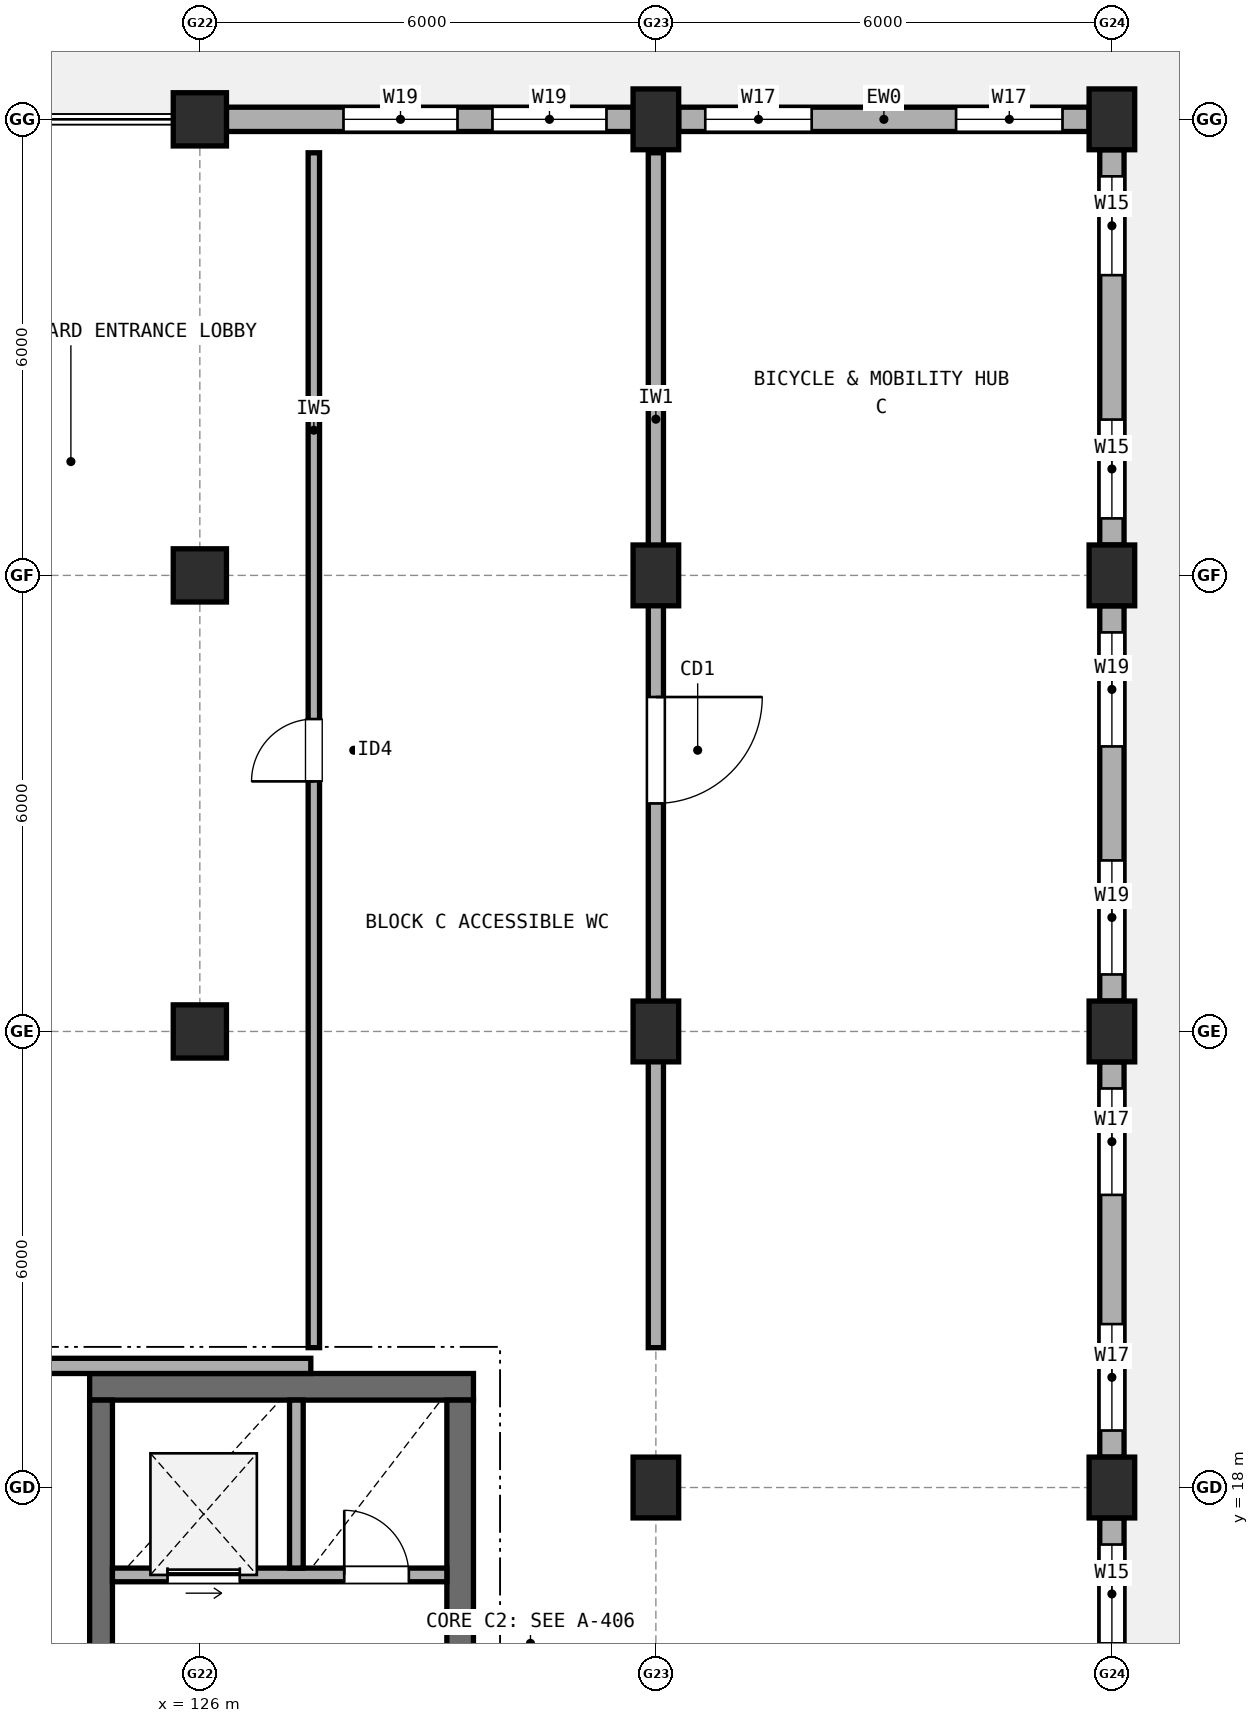
"""IFC4 building model, lengths in metres.
Left out: names, types, materials, properties, quantities, classifications, styles, units other than length and angle.
Written with IfcOpenShell. Run it as: python <this file> out.ifc"""

import sys

from ifc_helpers import new_model, si_unit, direction, frame, frame_2d, origin, origin_2d, place, context, subcontext, project, spatial, rectangle, extrude, element, fill, save


model = new_model("IFC4")
c1 = context("Model", 3, precision=1e-05, world=origin(), true_north=direction((0.0, 1.0)))
c2 = subcontext(c1, "Body", "Model", "MODEL_VIEW")
j1 = project(units=[si_unit("LENGTHUNIT", "METRE"), si_unit("PLANEANGLEUNIT", "RADIAN")], contexts=[c1])
p1 = place(None, origin())
s1 = spatial("IfcSite", under=j1, at=p1, CompositionType="ELEMENT")
p2 = place(p1, origin())
s2 = spatial("IfcBuilding", under=s1, at=p2, CompositionType="ELEMENT")
p3 = place(p2, origin())
s3 = spatial("IfcBuildingStorey", under=s2, at=p3, CompositionType="ELEMENT", Elevation=0.0)
for number, where, z_axis, x_axis in (
    (1, (126.0, 24.0, 0.0), (0.0, 0.0, 1.0), (1.0, 0.0, 0.0)),
    (2, (126.0, 30.0, 0.0), (0.0, 0.0, 1.0), (1.0, 0.0, 0.0)),
    (3, (126.0, 36.0, 0.0), (0.0, 0.0, 1.0), (1.0, 0.0, 0.0)),
):
    element("IfcColumn", number, at=place(p3, frame(where, z_axis=z_axis, x_axis=x_axis)), inside=s3, PredefinedType="COLUMN", context=c2, shape_type="SweptSolid", body=[
        extrude(rectangle(XDim=0.7, YDim=0.7, at=origin_2d()), origin(), (0.0, 0.0, 1.0), 4.23),
    ])
for number, where, z_axis, x_axis in (
    (4, (132.0, 18.0, 0.0), (0.0, 0.0, 1.0), (1.0, 0.0, 0.0)),
    (5, (132.0, 24.0, 0.0), (0.0, 0.0, 1.0), (1.0, 0.0, 0.0)),
    (6, (132.0, 30.0, 0.0), (0.0, 0.0, 1.0), (1.0, 0.0, 0.0)),
    (7, (132.0, 36.0, 0.0), (0.0, 0.0, 1.0), (1.0, 0.0, 0.0)),
    (8, (138.0, 18.0, 0.0), (0.0, 0.0, 1.0), (1.0, 0.0, 0.0)),
    (9, (138.0, 24.0, 0.0), (0.0, 0.0, 1.0), (1.0, 0.0, 0.0)),
    (10, (138.0, 30.0, 0.0), (0.0, 0.0, 1.0), (1.0, 0.0, 0.0)),
    (11, (138.0, 36.0, 0.0), (0.0, 0.0, 1.0), (1.0, 0.0, 0.0)),
):
    element("IfcColumn", number, at=place(p3, frame(where, z_axis=z_axis, x_axis=x_axis)), inside=s3, PredefinedType="COLUMN", context=c2, shape_type="SweptSolid", body=[
        extrude(rectangle(XDim=0.6, YDim=0.8, at=origin_2d()), origin(), (0.0, 0.0, 1.0), 4.23),
    ])
p4 = place(p3, frame((138.0, 12.4, 0.0), z_axis=(0.0, 0.0, 1.0), x_axis=(0.0, 1.0, 0.0)))
e12 = element("IfcWall", 12, at=p4, inside=s3, PredefinedType="STANDARD", context=c2, shape_type="SweptSolid", body=[
    extrude(rectangle(XDim=5.2, YDim=0.32, at=frame_2d((2.6, 0.0))), origin(), (0.0, 0.0, 1.0), 3.712),
])
p5 = place(p4, frame((0.35, 0.0, 0.9)))
e13 = element("IfcOpeningElement", 13, at=p5, cuts=e12, PredefinedType="OPENING", context=c2, shape_type="SweptSolid", body=[
    extrude(rectangle(XDim=1.3, YDim=1.45, at=frame_2d((0.65, 0.725))), frame((0.0, 0.17, 0.0), z_axis=(0.0, -1.0, 0.0), x_axis=(1.0, 0.0, 0.0)), (0.0, 0.0, 1.0), 0.34),
])
p6 = place(p4, frame((3.55, 0.0, 0.9)))
e14 = element("IfcOpeningElement", 14, at=p6, cuts=e12, PredefinedType="OPENING", context=c2, shape_type="SweptSolid", body=[
    extrude(rectangle(XDim=1.3, YDim=1.45, at=frame_2d((0.65, 0.725))), frame((0.0, 0.17, 0.0), z_axis=(0.0, -1.0, 0.0), x_axis=(1.0, 0.0, 0.0)), (0.0, 0.0, 1.0), 0.34),
])
p7 = place(p3, frame((138.0, 18.4, 0.0), z_axis=(0.0, 0.0, 1.0), x_axis=(0.0, 1.0, 0.0)))
e15 = element("IfcWall", 15, at=p7, inside=s3, PredefinedType="STANDARD", context=c2, shape_type="SweptSolid", body=[
    extrude(rectangle(XDim=5.2, YDim=0.32, at=frame_2d((2.6, 0.0))), origin(), (0.0, 0.0, 1.0), 3.712),
])
p8 = place(p7, frame((0.35, 0.0, 0.9)))
e16 = element("IfcOpeningElement", 16, at=p8, cuts=e15, PredefinedType="OPENING", context=c2, shape_type="SweptSolid", body=[
    extrude(rectangle(XDim=1.4, YDim=1.5, at=frame_2d((0.7, 0.75))), frame((0.0, 0.17, 0.0), z_axis=(0.0, -1.0, 0.0), x_axis=(1.0, 0.0, 0.0)), (0.0, 0.0, 1.0), 0.34),
])
p9 = place(p7, frame((3.45, 0.0, 0.9)))
e17 = element("IfcOpeningElement", 17, at=p9, cuts=e15, PredefinedType="OPENING", context=c2, shape_type="SweptSolid", body=[
    extrude(rectangle(XDim=1.4, YDim=1.5, at=frame_2d((0.7, 0.75))), frame((0.0, 0.17, 0.0), z_axis=(0.0, -1.0, 0.0), x_axis=(1.0, 0.0, 0.0)), (0.0, 0.0, 1.0), 0.34),
])
p10 = place(p3, frame((138.0, 24.4, 0.0), z_axis=(0.0, 0.0, 1.0), x_axis=(0.0, 1.0, 0.0)))
e18 = element("IfcWall", 18, at=p10, inside=s3, PredefinedType="STANDARD", context=c2, shape_type="SweptSolid", body=[
    extrude(rectangle(XDim=5.2, YDim=0.32, at=frame_2d((2.6, 0.0))), origin(), (0.0, 0.0, 1.0), 3.712),
])
p11 = place(p10, frame((0.35, 0.0, 0.9)))
e19 = element("IfcOpeningElement", 19, at=p11, cuts=e18, PredefinedType="OPENING", context=c2, shape_type="SweptSolid", body=[
    extrude(rectangle(XDim=1.5, YDim=1.5, at=frame_2d((0.75, 0.75))), frame((0.0, 0.17, 0.0), z_axis=(0.0, -1.0, 0.0), x_axis=(1.0, 0.0, 0.0)), (0.0, 0.0, 1.0), 0.34),
])
p12 = place(p10, frame((3.35, 0.0, 0.9)))
e20 = element("IfcOpeningElement", 20, at=p12, cuts=e18, PredefinedType="OPENING", context=c2, shape_type="SweptSolid", body=[
    extrude(rectangle(XDim=1.5, YDim=1.5, at=frame_2d((0.75, 0.75))), frame((0.0, 0.17, 0.0), z_axis=(0.0, -1.0, 0.0), x_axis=(1.0, 0.0, 0.0)), (0.0, 0.0, 1.0), 0.34),
])
p13 = place(p3, frame((138.0, 30.4, 0.0), z_axis=(0.0, 0.0, 1.0), x_axis=(0.0, 1.0, 0.0)))
e21 = element("IfcWall", 21, at=p13, inside=s3, PredefinedType="STANDARD", context=c2, shape_type="SweptSolid", body=[
    extrude(rectangle(XDim=5.2, YDim=0.32, at=frame_2d((2.6, 0.0))), origin(), (0.0, 0.0, 1.0), 3.712),
])
p14 = place(p13, frame((0.35, 0.0, 0.9)))
e22 = element("IfcOpeningElement", 22, at=p14, cuts=e21, PredefinedType="OPENING", context=c2, shape_type="SweptSolid", body=[
    extrude(rectangle(XDim=1.3, YDim=1.45, at=frame_2d((0.65, 0.725))), frame((0.0, 0.17, 0.0), z_axis=(0.0, -1.0, 0.0), x_axis=(1.0, 0.0, 0.0)), (0.0, 0.0, 1.0), 0.34),
])
p15 = place(p13, frame((3.55, 0.0, 0.9)))
e23 = element("IfcOpeningElement", 23, at=p15, cuts=e21, PredefinedType="OPENING", context=c2, shape_type="SweptSolid", body=[
    extrude(rectangle(XDim=1.3, YDim=1.45, at=frame_2d((0.65, 0.725))), frame((0.0, 0.17, 0.0), z_axis=(0.0, -1.0, 0.0), x_axis=(1.0, 0.0, 0.0)), (0.0, 0.0, 1.0), 0.34),
])
p16 = place(p3, frame((137.7, 36.0, 0.0), z_axis=(0.0, 0.0, 1.0), x_axis=(-1.0, 0.0, 0.0)))
e24 = element("IfcWall", 24, at=p16, inside=s3, PredefinedType="STANDARD", context=c2, shape_type="SweptSolid", body=[
    extrude(rectangle(XDim=5.4, YDim=0.32, at=frame_2d((2.7, 0.0))), origin(), (0.0, 0.0, 1.0), 3.112),
])
p17 = place(p16, frame((0.35, 0.0, 0.9)))
e25 = element("IfcOpeningElement", 25, at=p17, cuts=e24, PredefinedType="OPENING", context=c2, shape_type="SweptSolid", body=[
    extrude(rectangle(XDim=1.4, YDim=1.5, at=frame_2d((0.7, 0.75))), frame((0.0, 0.17, 0.0), z_axis=(0.0, -1.0, 0.0), x_axis=(1.0, 0.0, 0.0)), (0.0, 0.0, 1.0), 0.34),
])
p18 = place(p16, frame((3.65, 0.0, 0.9)))
e26 = element("IfcOpeningElement", 26, at=p18, cuts=e24, PredefinedType="OPENING", context=c2, shape_type="SweptSolid", body=[
    extrude(rectangle(XDim=1.4, YDim=1.5, at=frame_2d((0.7, 0.75))), frame((0.0, 0.17, 0.0), z_axis=(0.0, -1.0, 0.0), x_axis=(1.0, 0.0, 0.0)), (0.0, 0.0, 1.0), 0.34),
])
p19 = place(p3, frame((131.7, 36.0, 0.0), z_axis=(0.0, 0.0, 1.0), x_axis=(-1.0, 0.0, 0.0)))
e27 = element("IfcWall", 27, at=p19, inside=s3, PredefinedType="STANDARD", context=c2, shape_type="SweptSolid", body=[
    extrude(rectangle(XDim=5.35, YDim=0.32, at=frame_2d((2.675, 0.0))), origin(), (0.0, 0.0, 1.0), 3.112),
])
p20 = place(p19, frame((0.35, 0.0, 0.9)))
e28 = element("IfcOpeningElement", 28, at=p20, cuts=e27, PredefinedType="OPENING", context=c2, shape_type="SweptSolid", body=[
    extrude(rectangle(XDim=1.5, YDim=1.5, at=frame_2d((0.75, 0.75))), frame((0.0, 0.17, 0.0), z_axis=(0.0, -1.0, 0.0), x_axis=(1.0, 0.0, 0.0)), (0.0, 0.0, 1.0), 0.34),
])
p21 = place(p19, frame((2.31, 0.0, 0.9)))
e29 = element("IfcOpeningElement", 29, at=p21, cuts=e27, PredefinedType="OPENING", context=c2, shape_type="SweptSolid", body=[
    extrude(rectangle(XDim=1.5, YDim=1.5, at=frame_2d((0.75, 0.75))), frame((0.0, 0.17, 0.0), z_axis=(0.0, -1.0, 0.0), x_axis=(1.0, 0.0, 0.0)), (0.0, 0.0, 1.0), 0.34),
])
p22 = place(p3, frame((129.6, 19.325, 0.0), z_axis=(0.0, 0.0, 1.0), x_axis=(-1.0, 0.0, 0.0)))
e30 = element("IfcWall", 30, at=p22, inside=s3, PredefinedType="SHEAR", context=c2, shape_type="SweptSolid", body=[
    extrude(rectangle(XDim=5.05, YDim=0.35, at=frame_2d((2.525, 0.0))), origin(), (0.0, 0.0, 1.0), 4.23),
])
p23 = place(p3, frame((129.425, 12.75, 0.0), z_axis=(0.0, 0.0, 1.0), x_axis=(0.0, 1.0, 0.0)))
e31 = element("IfcWall", 31, at=p23, inside=s3, PredefinedType="SHEAR", context=c2, shape_type="SweptSolid", body=[
    extrude(rectangle(XDim=6.4, YDim=0.35, at=frame_2d((3.2, 0.0))), origin(), (0.0, 0.0, 1.0), 4.23),
])
p24 = place(p3, frame((124.7, 15.7, 0.0), z_axis=(0.0, 0.0, 1.0), x_axis=(0.0, 1.0, 0.0)))
e32 = element("IfcWall", 32, at=p24, inside=s3, PredefinedType="SHEAR", context=c2, shape_type="SweptSolid", body=[
    extrude(rectangle(XDim=3.45, YDim=0.3, at=frame_2d((1.725, 0.0))), origin(), (0.0, 0.0, 1.0), 4.23),
])
p25 = place(p3, frame((124.85, 16.85, 0.0), z_axis=(0.0, 0.0, 1.0), x_axis=(1.0, 0.0, 0.0)))
e33 = element("IfcWall", 33, at=p25, inside=s3, PredefinedType="SOLIDWALL", context=c2, shape_type="SweptSolid", body=[
    extrude(rectangle(XDim=4.4, YDim=0.18, at=frame_2d((2.2, 0.0))), origin(), (0.0, 0.0, 1.0), 4.23),
])
p26 = place(p25, frame((0.725, 0.0, 0.0)))
e34 = element("IfcOpeningElement", 34, at=p26, cuts=e33, PredefinedType="OPENING", context=c2, shape_type="SweptSolid", body=[
    extrude(rectangle(XDim=0.95, YDim=2.15, at=frame_2d((0.475, 1.075))), frame((0.0, 0.1, 0.0), z_axis=(0.0, -1.0, 0.0), x_axis=(1.0, 0.0, 0.0)), (0.0, 0.0, 1.0), 0.2),
])
p27 = place(p25, frame((3.05, 0.0, 0.0)))
e35 = element("IfcOpeningElement", 35, at=p27, cuts=e33, PredefinedType="OPENING", context=c2, shape_type="SweptSolid", body=[
    extrude(rectangle(XDim=0.85, YDim=2.1, at=frame_2d((0.425, 1.05))), frame((0.0, 0.1, 0.0), z_axis=(0.0, -1.0, 0.0), x_axis=(1.0, 0.0, 0.0)), (0.0, 0.0, 1.0), 0.2),
])
p28 = place(p3, frame((127.27, 16.94, 0.0), z_axis=(0.0, 0.0, 1.0), x_axis=(0.0, 1.0, 0.0)))
e36 = element("IfcWall", 36, at=p28, inside=s3, PredefinedType="SOLIDWALL", context=c2, shape_type="SweptSolid", body=[
    extrude(rectangle(XDim=2.21, YDim=0.18, at=frame_2d((1.105, 0.0))), origin(), (0.0, 0.0, 1.0), 4.23),
])
p29 = place(p3, frame((118.09, 19.6, 0.0), z_axis=(0.0, 0.0, 1.0), x_axis=(1.0, 0.0, 0.0)))
e37 = element("IfcWall", 37, at=p29, inside=s3, PredefinedType="SOLIDWALL", context=c2, shape_type="SweptSolid", body=[
    extrude(rectangle(XDim=9.37, YDim=0.2, at=frame_2d((4.685, 0.0))), origin(), (0.0, 0.0, 1.0), 4.23),
])
p30 = place(p29, frame((4.035, 0.0, 0.0)))
e38 = element("IfcOpeningElement", 38, at=p30, cuts=e37, PredefinedType="OPENING", context=c2, shape_type="SweptSolid", body=[
    extrude(rectangle(XDim=1.3, YDim=2.15, at=frame_2d((0.65, 1.075))), frame((0.0, 0.11, 0.0), z_axis=(0.0, -1.0, 0.0), x_axis=(1.0, 0.0, 0.0)), (0.0, 0.0, 1.0), 0.22),
])
p31 = place(p3, frame((127.5, 19.84, 0.0), z_axis=(0.0, 0.0, 1.0), x_axis=(0.0, 1.0, 0.0)))
e39 = element("IfcWall", 39, at=p31, inside=s3, PredefinedType="PARTITIONING", context=c2, shape_type="SweptSolid", body=[
    extrude(rectangle(XDim=15.72, YDim=0.15, at=frame_2d((7.86, 0.0))), origin(), (0.0, 0.0, 1.0), 3.562),
])
p32 = place(p31, frame((7.45, 0.0, 0.0)))
e40 = element("IfcOpeningElement", 40, at=p32, cuts=e39, PredefinedType="OPENING", context=c2, shape_type="SweptSolid", body=[
    extrude(rectangle(XDim=0.82, YDim=2.08, at=frame_2d((0.41, 1.04))), frame((0.0, 0.085, 0.0), z_axis=(0.0, -1.0, 0.0), x_axis=(1.0, 0.0, 0.0)), (0.0, 0.0, 1.0), 0.17),
])
p33 = place(p3, frame((132.0, 19.84, 0.0), z_axis=(0.0, 0.0, 1.0), x_axis=(0.0, 1.0, 0.0)))
e41 = element("IfcWall", 41, at=p33, inside=s3, PredefinedType="SOLIDWALL", context=c2, shape_type="SweptSolid", body=[
    extrude(rectangle(XDim=15.72, YDim=0.2, at=frame_2d((7.86, 0.0))), origin(), (0.0, 0.0, 1.0), 3.712),
])
p34 = place(p33, frame((7.16, 0.0, 0.0)))
e42 = element("IfcOpeningElement", 42, at=p34, cuts=e41, PredefinedType="OPENING", context=c2, shape_type="SweptSolid", body=[
    extrude(rectangle(XDim=1.4, YDim=2.15, at=frame_2d((0.7, 1.075))), frame((0.0, 0.11, 0.0), z_axis=(0.0, -1.0, 0.0), x_axis=(1.0, 0.0, 0.0)), (0.0, 0.0, 1.0), 0.22),
])
p35 = place(p6, origin())
e43 = element("IfcWindow", 43, at=p35, inside=s3, PartitioningType="SINGLE_PANEL", PredefinedType="WINDOW", context=c2, shape_type="SweptSolid", body=[
    extrude(rectangle(XDim=1.3, YDim=1.45, at=frame_2d((0.65, 0.725))), frame((0.0, 0.03, 0.0), z_axis=(0.0, -1.0, 0.0), x_axis=(1.0, 0.0, 0.0)), (0.0, 0.0, 1.0), 0.06),
])
fill(e14, e43)
p36 = place(p8, origin())
e44 = element("IfcWindow", 44, at=p36, inside=s3, PartitioningType="SINGLE_PANEL", PredefinedType="WINDOW", context=c2, shape_type="SweptSolid", body=[
    extrude(rectangle(XDim=1.4, YDim=1.5, at=frame_2d((0.7, 0.75))), frame((0.0, 0.03, 0.0), z_axis=(0.0, -1.0, 0.0), x_axis=(1.0, 0.0, 0.0)), (0.0, 0.0, 1.0), 0.06),
])
fill(e16, e44)
p37 = place(p9, origin())
e45 = element("IfcWindow", 45, at=p37, inside=s3, PartitioningType="SINGLE_PANEL", PredefinedType="WINDOW", context=c2, shape_type="SweptSolid", body=[
    extrude(rectangle(XDim=1.4, YDim=1.5, at=frame_2d((0.7, 0.75))), frame((0.0, 0.03, 0.0), z_axis=(0.0, -1.0, 0.0), x_axis=(1.0, 0.0, 0.0)), (0.0, 0.0, 1.0), 0.06),
])
fill(e17, e45)
p38 = place(p11, origin())
e46 = element("IfcWindow", 46, at=p38, inside=s3, PartitioningType="SINGLE_PANEL", PredefinedType="WINDOW", context=c2, shape_type="SweptSolid", body=[
    extrude(rectangle(XDim=1.5, YDim=1.5, at=frame_2d((0.75, 0.75))), frame((0.0, 0.03, 0.0), z_axis=(0.0, -1.0, 0.0), x_axis=(1.0, 0.0, 0.0)), (0.0, 0.0, 1.0), 0.06),
])
fill(e19, e46)
p39 = place(p12, origin())
e47 = element("IfcWindow", 47, at=p39, inside=s3, PartitioningType="SINGLE_PANEL", PredefinedType="WINDOW", context=c2, shape_type="SweptSolid", body=[
    extrude(rectangle(XDim=1.5, YDim=1.5, at=frame_2d((0.75, 0.75))), frame((0.0, 0.03, 0.0), z_axis=(0.0, -1.0, 0.0), x_axis=(1.0, 0.0, 0.0)), (0.0, 0.0, 1.0), 0.06),
])
fill(e20, e47)
p40 = place(p14, origin())
e48 = element("IfcWindow", 48, at=p40, inside=s3, PartitioningType="SINGLE_PANEL", PredefinedType="WINDOW", context=c2, shape_type="SweptSolid", body=[
    extrude(rectangle(XDim=1.3, YDim=1.45, at=frame_2d((0.65, 0.725))), frame((0.0, 0.03, 0.0), z_axis=(0.0, -1.0, 0.0), x_axis=(1.0, 0.0, 0.0)), (0.0, 0.0, 1.0), 0.06),
])
fill(e22, e48)
p41 = place(p15, origin())
e49 = element("IfcWindow", 49, at=p41, inside=s3, PartitioningType="SINGLE_PANEL", PredefinedType="WINDOW", context=c2, shape_type="SweptSolid", body=[
    extrude(rectangle(XDim=1.3, YDim=1.45, at=frame_2d((0.65, 0.725))), frame((0.0, 0.03, 0.0), z_axis=(0.0, -1.0, 0.0), x_axis=(1.0, 0.0, 0.0)), (0.0, 0.0, 1.0), 0.06),
])
fill(e23, e49)
p42 = place(p17, origin())
e50 = element("IfcWindow", 50, at=p42, inside=s3, PartitioningType="SINGLE_PANEL", PredefinedType="WINDOW", context=c2, shape_type="SweptSolid", body=[
    extrude(rectangle(XDim=1.4, YDim=1.5, at=frame_2d((0.7, 0.75))), frame((0.0, 0.03, 0.0), z_axis=(0.0, -1.0, 0.0), x_axis=(1.0, 0.0, 0.0)), (0.0, 0.0, 1.0), 0.06),
])
fill(e25, e50)
p43 = place(p18, origin())
e51 = element("IfcWindow", 51, at=p43, inside=s3, PartitioningType="SINGLE_PANEL", PredefinedType="WINDOW", context=c2, shape_type="SweptSolid", body=[
    extrude(rectangle(XDim=1.4, YDim=1.5, at=frame_2d((0.7, 0.75))), frame((0.0, 0.03, 0.0), z_axis=(0.0, -1.0, 0.0), x_axis=(1.0, 0.0, 0.0)), (0.0, 0.0, 1.0), 0.06),
])
fill(e26, e51)
p44 = place(p20, origin())
e52 = element("IfcWindow", 52, at=p44, inside=s3, PartitioningType="SINGLE_PANEL", PredefinedType="WINDOW", context=c2, shape_type="SweptSolid", body=[
    extrude(rectangle(XDim=1.5, YDim=1.5, at=frame_2d((0.75, 0.75))), frame((0.0, 0.03, 0.0), z_axis=(0.0, -1.0, 0.0), x_axis=(1.0, 0.0, 0.0)), (0.0, 0.0, 1.0), 0.06),
])
fill(e28, e52)
p45 = place(p21, origin())
e53 = element("IfcWindow", 53, at=p45, inside=s3, PartitioningType="SINGLE_PANEL", PredefinedType="WINDOW", context=c2, shape_type="SweptSolid", body=[
    extrude(rectangle(XDim=1.5, YDim=1.5, at=frame_2d((0.75, 0.75))), frame((0.0, 0.03, 0.0), z_axis=(0.0, -1.0, 0.0), x_axis=(1.0, 0.0, 0.0)), (0.0, 0.0, 1.0), 0.06),
])
fill(e29, e53)
p46 = place(p26, origin())
e54 = element("IfcDoor", 54, at=p46, inside=s3, OperationType="SLIDING_TO_LEFT", PredefinedType="DOOR", context=c2, shape_type="SweptSolid", body=[
    extrude(rectangle(XDim=0.95, YDim=2.15, at=frame_2d((0.475, 1.075))), frame((0.0, 0.025, 0.0), z_axis=(0.0, -1.0, 0.0), x_axis=(1.0, 0.0, 0.0)), (0.0, 0.0, 1.0), 0.05),
])
fill(e34, e54)
p47 = place(p27, frame((0.85, 0.0, 0.0), z_axis=(0.0, 0.0, 1.0), x_axis=(-1.0, 0.0, 0.0)))
e55 = element("IfcDoor", 55, at=p47, inside=s3, OperationType="SINGLE_SWING_LEFT", PredefinedType="DOOR", context=c2, shape_type="SweptSolid", body=[
    extrude(rectangle(XDim=0.85, YDim=2.1, at=frame_2d((0.425, 1.05))), frame((0.0, 0.025, 0.0), z_axis=(0.0, -1.0, 0.0), x_axis=(1.0, 0.0, 0.0)), (0.0, 0.0, 1.0), 0.05),
])
fill(e35, e55)
p48 = place(p32, origin())
e56 = element("IfcDoor", 56, at=p48, inside=s3, OperationType="SINGLE_SWING_LEFT", PredefinedType="DOOR", context=c2, shape_type="SweptSolid", body=[
    extrude(rectangle(XDim=0.82, YDim=2.08, at=frame_2d((0.41, 1.04))), frame((0.0, 0.025, 0.0), z_axis=(0.0, -1.0, 0.0), x_axis=(1.0, 0.0, 0.0)), (0.0, 0.0, 1.0), 0.05),
])
fill(e40, e56)
p49 = place(p34, origin())
e57 = element("IfcDoor", 57, at=p49, inside=s3, OperationType="SINGLE_SWING_RIGHT", PredefinedType="DOOR", context=c2, shape_type="SweptSolid", body=[
    extrude(rectangle(XDim=1.4, YDim=2.15, at=frame_2d((0.7, 1.075))), frame((0.0, 0.025, 0.0), z_axis=(0.0, -1.0, 0.0), x_axis=(1.0, 0.0, 0.0)), (0.0, 0.0, 1.0), 0.05),
])
fill(e42, e57)
save(model, sys.argv[1])
